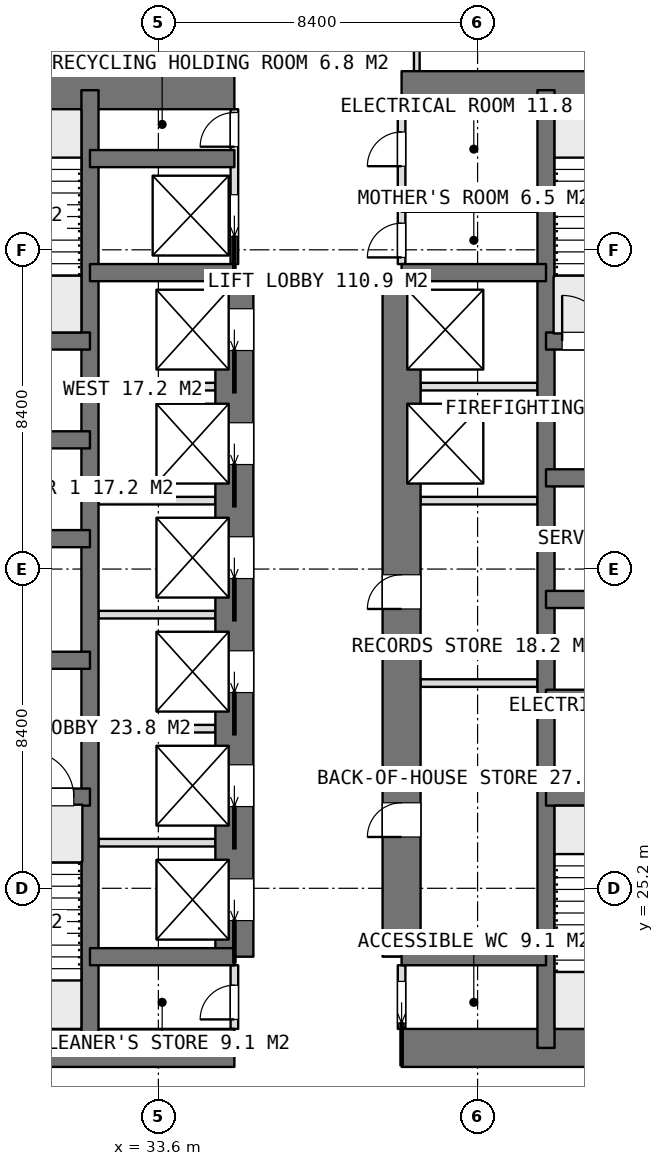
"""IFC4 building model, lengths in metres.
Left out: names, types, materials, properties, quantities, classifications, styles, units other than length and angle.
Written with IfcOpenShell. Run it as: python <this file> out.ifc"""

import sys

from ifc_helpers import new_model, si_unit, direction, frame, frame_2d, origin, place, context, subcontext, project, spatial, rectangle, extrude, element, fill, save


model = new_model("IFC4")
c1 = context("Model", 3, precision=1e-05, world=origin(), true_north=direction((0.0, 1.0)))
c2 = subcontext(c1, "Body", "Model", "MODEL_VIEW")
j1 = project(units=[si_unit("LENGTHUNIT", "METRE"), si_unit("PLANEANGLEUNIT", "RADIAN")], contexts=[c1])
p1 = place(None, origin())
s1 = spatial("IfcSite", under=j1, at=p1, CompositionType="ELEMENT")
p2 = place(p1, origin())
s2 = spatial("IfcBuilding", under=s1, at=p2, CompositionType="ELEMENT")
p3 = place(p2, frame((0.0, 0.0, 236.45)))
s3 = spatial("IfcBuildingStorey", under=s2, at=p3, CompositionType="ELEMENT", Elevation=236.45)
p4 = place(p3, frame((25.2, 21.0, 0.0), z_axis=(0.0, 0.0, 1.0), x_axis=(1.0, 0.0, 0.0)))
e1 = element("IfcWall", 1, at=p4, inside=s3, PredefinedType="SHEAR", context=c2, shape_type="SweptSolid", body=[
    extrude(rectangle(XDim=10.4, YDim=1.0, at=frame_2d((5.2, 0.0))), origin(), (0.0, 0.0, 1.0), 3.75),
])
p5 = place(p3, frame((40.0, 21.0, 0.0), z_axis=(0.0, 0.0, 1.0), x_axis=(1.0, 0.0, 0.0)))
e2 = element("IfcWall", 2, at=p5, inside=s3, PredefinedType="SHEAR", context=c2, shape_type="SweptSolid", body=[
    extrude(rectangle(XDim=10.4, YDim=1.0, at=frame_2d((5.2, 0.0))), origin(), (0.0, 0.0, 1.0), 3.75),
])
p6 = place(p3, frame((25.2, 46.2, 0.0), z_axis=(0.0, 0.0, 1.0), x_axis=(1.0, 0.0, 0.0)))
e3 = element("IfcWall", 3, at=p6, inside=s3, PredefinedType="SHEAR", context=c2, shape_type="SweptSolid", body=[
    extrude(rectangle(XDim=10.4, YDim=1.0, at=frame_2d((5.2, 0.0))), origin(), (0.0, 0.0, 1.0), 3.75),
])
p7 = place(p3, frame((40.0, 46.2, 0.0), z_axis=(0.0, 0.0, 1.0), x_axis=(1.0, 0.0, 0.0)))
e4 = element("IfcWall", 4, at=p7, inside=s3, PredefinedType="SHEAR", context=c2, shape_type="SweptSolid", body=[
    extrude(rectangle(XDim=10.4, YDim=1.0, at=frame_2d((5.2, 0.0))), origin(), (0.0, 0.0, 1.0), 3.75),
])
for number, where, z_axis, x_axis in (
    (5, (31.8, 21.0, 0.0), (0.0, 0.0, 1.0), (0.0, 1.0, 0.0)),
    (6, (43.8, 21.0, 0.0), (0.0, 0.0, 1.0), (0.0, 1.0, 0.0)),
):
    element("IfcWall", number, at=place(p3, frame(where, z_axis=z_axis, x_axis=x_axis)), inside=s3, PredefinedType="SHEAR", context=c2, shape_type="SweptSolid", body=[
        extrude(rectangle(XDim=25.2, YDim=0.45, at=frame_2d((12.6, 0.0))), origin(), (0.0, 0.0, 1.0), 3.75),
    ])
p8 = place(p3, frame((35.6, 23.4, 0.0), z_axis=(0.0, 0.0, 1.0), x_axis=(0.0, 1.0, 0.0)))
e7 = element("IfcWall", 7, at=p8, inside=s3, PredefinedType="SHEAR", context=c2, shape_type="SweptSolid", body=[
    extrude(rectangle(XDim=18.0, YDim=1.0, at=frame_2d((9.0, 0.0))), origin(), (0.0, 0.0, 1.0), 3.75),
])
p9 = place(p8, frame((0.95, 0.0, 0.0)))
e8 = element("IfcOpeningElement", 8, at=p9, cuts=e7, PredefinedType="OPENING", context=c2, shape_type="SweptSolid", body=[
    extrude(rectangle(XDim=1.1, YDim=2.1, at=frame_2d((0.55, 1.05))), frame((0.0, 0.51, 0.0), z_axis=(0.0, -1.0, 0.0), x_axis=(1.0, 0.0, 0.0)), (0.0, 0.0, 1.0), 1.02),
])
p10 = place(p8, frame((3.95, 0.0, 0.0)))
e9 = element("IfcOpeningElement", 9, at=p10, cuts=e7, PredefinedType="OPENING", context=c2, shape_type="SweptSolid", body=[
    extrude(rectangle(XDim=1.1, YDim=2.1, at=frame_2d((0.55, 1.05))), frame((0.0, 0.51, 0.0), z_axis=(0.0, -1.0, 0.0), x_axis=(1.0, 0.0, 0.0)), (0.0, 0.0, 1.0), 1.02),
])
p11 = place(p8, frame((6.95, 0.0, 0.0)))
e10 = element("IfcOpeningElement", 10, at=p11, cuts=e7, PredefinedType="OPENING", context=c2, shape_type="SweptSolid", body=[
    extrude(rectangle(XDim=1.1, YDim=2.1, at=frame_2d((0.55, 1.05))), frame((0.0, 0.51, 0.0), z_axis=(0.0, -1.0, 0.0), x_axis=(1.0, 0.0, 0.0)), (0.0, 0.0, 1.0), 1.02),
])
p12 = place(p8, frame((9.95, 0.0, 0.0)))
e11 = element("IfcOpeningElement", 11, at=p12, cuts=e7, PredefinedType="OPENING", context=c2, shape_type="SweptSolid", body=[
    extrude(rectangle(XDim=1.1, YDim=2.1, at=frame_2d((0.55, 1.05))), frame((0.0, 0.51, 0.0), z_axis=(0.0, -1.0, 0.0), x_axis=(1.0, 0.0, 0.0)), (0.0, 0.0, 1.0), 1.02),
])
p13 = place(p8, frame((12.95, 0.0, 0.0)))
e12 = element("IfcOpeningElement", 12, at=p13, cuts=e7, PredefinedType="OPENING", context=c2, shape_type="SweptSolid", body=[
    extrude(rectangle(XDim=1.1, YDim=2.1, at=frame_2d((0.55, 1.05))), frame((0.0, 0.51, 0.0), z_axis=(0.0, -1.0, 0.0), x_axis=(1.0, 0.0, 0.0)), (0.0, 0.0, 1.0), 1.02),
])
p14 = place(p8, frame((15.95, 0.0, 0.0)))
e13 = element("IfcOpeningElement", 13, at=p14, cuts=e7, PredefinedType="OPENING", context=c2, shape_type="SweptSolid", body=[
    extrude(rectangle(XDim=1.1, YDim=2.1, at=frame_2d((0.55, 1.05))), frame((0.0, 0.51, 0.0), z_axis=(0.0, -1.0, 0.0), x_axis=(1.0, 0.0, 0.0)), (0.0, 0.0, 1.0), 1.02),
])
p15 = place(p3, frame((40.0, 23.4, 0.0), z_axis=(0.0, 0.0, 1.0), x_axis=(0.0, 1.0, 0.0)))
e14 = element("IfcWall", 14, at=p15, inside=s3, PredefinedType="SHEAR", context=c2, shape_type="SweptSolid", body=[
    extrude(rectangle(XDim=18.0, YDim=1.0, at=frame_2d((9.0, 0.0))), origin(), (0.0, 0.0, 1.0), 3.75),
])
p16 = place(p15, frame((3.15, 0.0, 0.0)))
e15 = element("IfcOpeningElement", 15, at=p16, cuts=e14, PredefinedType="OPENING", context=c2, shape_type="SweptSolid", body=[
    extrude(rectangle(XDim=0.9, YDim=2.1, at=frame_2d((0.45, 1.05))), frame((0.0, 0.51, 0.0), z_axis=(0.0, -1.0, 0.0), x_axis=(1.0, 0.0, 0.0)), (0.0, 0.0, 1.0), 1.02),
])
p17 = place(p15, frame((9.15, 0.0, 0.0)))
e16 = element("IfcOpeningElement", 16, at=p17, cuts=e14, PredefinedType="OPENING", context=c2, shape_type="SweptSolid", body=[
    extrude(rectangle(XDim=0.9, YDim=2.1, at=frame_2d((0.45, 1.05))), frame((0.0, 0.51, 0.0), z_axis=(0.0, -1.0, 0.0), x_axis=(1.0, 0.0, 0.0)), (0.0, 0.0, 1.0), 1.02),
])
for number, where, z_axis, x_axis in (
    (17, (31.8, 23.4, 0.0), (0.0, 0.0, 1.0), (1.0, 0.0, 0.0)),
    (18, (31.8, 41.4, 0.0), (0.0, 0.0, 1.0), (1.0, 0.0, 0.0)),
    (19, (31.8, 44.4, 0.0), (0.0, 0.0, 1.0), (1.0, 0.0, 0.0)),
    (20, (40.0, 23.4, 0.0), (0.0, 0.0, 1.0), (1.0, 0.0, 0.0)),
    (21, (40.0, 41.4, 0.0), (0.0, 0.0, 1.0), (1.0, 0.0, 0.0)),
):
    element("IfcWall", number, at=place(p3, frame(where, z_axis=z_axis, x_axis=x_axis)), inside=s3, PredefinedType="SHEAR", context=c2, shape_type="SweptSolid", body=[
        extrude(rectangle(XDim=3.8, YDim=0.45, at=frame_2d((1.9, 0.0))), origin(), (0.0, 0.0, 1.0), 3.75),
    ])
p18 = place(p3, frame((25.2, 27.6, 0.0), z_axis=(0.0, 0.0, 1.0), x_axis=(1.0, 0.0, 0.0)))
e22 = element("IfcWall", 22, at=p18, inside=s3, PredefinedType="SHEAR", context=c2, shape_type="SweptSolid", body=[
    extrude(rectangle(XDim=6.6, YDim=0.45, at=frame_2d((3.3, 0.0))), origin(), (0.0, 0.0, 1.0), 3.75),
])
p19 = place(p18, frame((4.975, 0.0, 0.0)))
e23 = element("IfcOpeningElement", 23, at=p19, cuts=e22, PredefinedType="OPENING", context=c2, shape_type="SweptSolid", body=[
    extrude(rectangle(XDim=1.2, YDim=2.1, at=frame_2d((0.6, 1.05))), frame((0.0, 0.235, 0.0), z_axis=(0.0, -1.0, 0.0), x_axis=(1.0, 0.0, 0.0)), (0.0, 0.0, 1.0), 0.47),
])
p20 = place(p3, frame((25.2, 31.2, 0.0), z_axis=(0.0, 0.0, 1.0), x_axis=(1.0, 0.0, 0.0)))
e24 = element("IfcWall", 24, at=p20, inside=s3, PredefinedType="SHEAR", context=c2, shape_type="SweptSolid", body=[
    extrude(rectangle(XDim=6.6, YDim=0.45, at=frame_2d((3.3, 0.0))), origin(), (0.0, 0.0, 1.0), 3.75),
])
p21 = place(p20, frame((2.65, 0.0, 0.0)))
e25 = element("IfcOpeningElement", 25, at=p21, cuts=e24, PredefinedType="OPENING", context=c2, shape_type="SweptSolid", body=[
    extrude(rectangle(XDim=1.3, YDim=2.1, at=frame_2d((0.65, 1.05))), frame((0.0, 0.235, 0.0), z_axis=(0.0, -1.0, 0.0), x_axis=(1.0, 0.0, 0.0)), (0.0, 0.0, 1.0), 0.47),
])
for number, where, z_axis, x_axis in (
    (26, (25.2, 34.4, 0.0), (0.0, 0.0, 1.0), (1.0, 0.0, 0.0)),
    (27, (25.2, 37.0, 0.0), (0.0, 0.0, 1.0), (1.0, 0.0, 0.0)),
    (28, (25.2, 39.6, 0.0), (0.0, 0.0, 1.0), (1.0, 0.0, 0.0)),
):
    element("IfcWall", number, at=place(p3, frame(where, z_axis=z_axis, x_axis=x_axis)), inside=s3, PredefinedType="SHEAR", context=c2, shape_type="SweptSolid", body=[
        extrude(rectangle(XDim=6.6, YDim=0.45, at=frame_2d((3.3, 0.0))), origin(), (0.0, 0.0, 1.0), 3.75),
    ])
for number, where, z_axis, x_axis in (
    (29, (43.8, 27.6, 0.0), (0.0, 0.0, 1.0), (1.0, 0.0, 0.0)),
    (30, (43.8, 30.2, 0.0), (0.0, 0.0, 1.0), (1.0, 0.0, 0.0)),
    (31, (43.8, 32.8, 0.0), (0.0, 0.0, 1.0), (1.0, 0.0, 0.0)),
):
    element("IfcWall", number, at=place(p3, frame(where, z_axis=z_axis, x_axis=x_axis)), inside=s3, PredefinedType="SHEAR", context=c2, shape_type="SweptSolid", body=[
        extrude(rectangle(XDim=6.6, YDim=0.45, at=frame_2d((3.3, 0.0))), origin(), (0.0, 0.0, 1.0), 3.75),
    ])
p22 = place(p3, frame((43.8, 36.0, 0.0), z_axis=(0.0, 0.0, 1.0), x_axis=(1.0, 0.0, 0.0)))
e32 = element("IfcWall", 32, at=p22, inside=s3, PredefinedType="SHEAR", context=c2, shape_type="SweptSolid", body=[
    extrude(rectangle(XDim=6.6, YDim=0.45, at=frame_2d((3.3, 0.0))), origin(), (0.0, 0.0, 1.0), 3.75),
])
p23 = place(p22, frame((2.65, 0.0, 0.0)))
e33 = element("IfcOpeningElement", 33, at=p23, cuts=e32, PredefinedType="OPENING", context=c2, shape_type="SweptSolid", body=[
    extrude(rectangle(XDim=1.3, YDim=2.1, at=frame_2d((0.65, 1.05))), frame((0.0, 0.235, 0.0), z_axis=(0.0, -1.0, 0.0), x_axis=(1.0, 0.0, 0.0)), (0.0, 0.0, 1.0), 0.47),
])
p24 = place(p3, frame((43.8, 39.6, 0.0), z_axis=(0.0, 0.0, 1.0), x_axis=(1.0, 0.0, 0.0)))
e34 = element("IfcWall", 34, at=p24, inside=s3, PredefinedType="SHEAR", context=c2, shape_type="SweptSolid", body=[
    extrude(rectangle(XDim=6.6, YDim=0.45, at=frame_2d((3.3, 0.0))), origin(), (0.0, 0.0, 1.0), 3.75),
])
p25 = place(p24, frame((0.425, 0.0, 0.0)))
e35 = element("IfcOpeningElement", 35, at=p25, cuts=e34, PredefinedType="OPENING", context=c2, shape_type="SweptSolid", body=[
    extrude(rectangle(XDim=1.2, YDim=2.1, at=frame_2d((0.6, 1.05))), frame((0.0, 0.235, 0.0), z_axis=(0.0, -1.0, 0.0), x_axis=(1.0, 0.0, 0.0)), (0.0, 0.0, 1.0), 0.47),
])
for number, where, z_axis, x_axis in (
    (36, (32.025, 26.4, 0.0), (0.0, 0.0, 1.0), (1.0, 0.0, 0.0)),
    (37, (32.025, 29.4, 0.0), (0.0, 0.0, 1.0), (1.0, 0.0, 0.0)),
    (38, (32.025, 32.4, 0.0), (0.0, 0.0, 1.0), (1.0, 0.0, 0.0)),
    (39, (32.025, 35.4, 0.0), (0.0, 0.0, 1.0), (1.0, 0.0, 0.0)),
    (40, (32.025, 38.4, 0.0), (0.0, 0.0, 1.0), (1.0, 0.0, 0.0)),
):
    element("IfcWall", number, at=place(p3, frame(where, z_axis=z_axis, x_axis=x_axis)), inside=s3, PredefinedType="PARTITIONING", context=c2, shape_type="SweptSolid", body=[
        extrude(rectangle(XDim=3.075, YDim=0.2, at=frame_2d((1.538, 0.0))), origin(), (0.0, 0.0, 1.0), 3.4),
    ])
for number, where, z_axis, x_axis in (
    (41, (40.5, 35.4, 0.0), (0.0, 0.0, 1.0), (1.0, 0.0, 0.0)),
    (42, (40.5, 38.4, 0.0), (0.0, 0.0, 1.0), (1.0, 0.0, 0.0)),
):
    element("IfcWall", number, at=place(p3, frame(where, z_axis=z_axis, x_axis=x_axis)), inside=s3, PredefinedType="PARTITIONING", context=c2, shape_type="SweptSolid", body=[
        extrude(rectangle(XDim=3.075, YDim=0.2, at=frame_2d((1.538, 0.0))), origin(), (0.0, 0.0, 1.0), 3.4),
    ])
p26 = place(p3, frame((40.0, 21.5, 0.0), z_axis=(0.0, 0.0, 1.0), x_axis=(0.0, 1.0, 0.0)))
e43 = element("IfcWall", 43, at=p26, inside=s3, PredefinedType="PARTITIONING", context=c2, shape_type="SweptSolid", body=[
    extrude(rectangle(XDim=1.675, YDim=0.2, at=frame_2d((0.837, 0.0))), origin(), (0.0, 0.0, 1.0), 3.4),
])
p27 = place(p26, frame((0.15, 0.0, 0.0)))
e44 = element("IfcOpeningElement", 44, at=p27, cuts=e43, PredefinedType="OPENING", context=c2, shape_type="SweptSolid", body=[
    extrude(rectangle(XDim=1.1, YDim=2.1, at=frame_2d((0.55, 1.05))), frame((0.0, 0.11, 0.0), z_axis=(0.0, -1.0, 0.0), x_axis=(1.0, 0.0, 0.0)), (0.0, 0.0, 1.0), 0.22),
])
p28 = place(p3, frame((40.0, 41.625, 0.0), z_axis=(0.0, 0.0, 1.0), x_axis=(0.0, 1.0, 0.0)))
e45 = element("IfcWall", 45, at=p28, inside=s3, PredefinedType="PARTITIONING", context=c2, shape_type="SweptSolid", body=[
    extrude(rectangle(XDim=4.075, YDim=0.2, at=frame_2d((2.038, 0.0))), origin(), (0.0, 0.0, 1.0), 3.4),
])
p29 = place(p28, frame((2.575, 0.0, 0.0)))
e46 = element("IfcOpeningElement", 46, at=p29, cuts=e45, PredefinedType="OPENING", context=c2, shape_type="SweptSolid", body=[
    extrude(rectangle(XDim=0.9, YDim=2.1, at=frame_2d((0.45, 1.05))), frame((0.0, 0.11, 0.0), z_axis=(0.0, -1.0, 0.0), x_axis=(1.0, 0.0, 0.0)), (0.0, 0.0, 1.0), 0.22),
])
p30 = place(p28, frame((0.175, 0.0, 0.0)))
e47 = element("IfcOpeningElement", 47, at=p30, cuts=e45, PredefinedType="OPENING", context=c2, shape_type="SweptSolid", body=[
    extrude(rectangle(XDim=0.9, YDim=2.1, at=frame_2d((0.45, 1.05))), frame((0.0, 0.11, 0.0), z_axis=(0.0, -1.0, 0.0), x_axis=(1.0, 0.0, 0.0)), (0.0, 0.0, 1.0), 0.22),
])
p31 = place(p3, frame((35.6, 41.625, 0.0), z_axis=(0.0, 0.0, 1.0), x_axis=(0.0, 1.0, 0.0)))
e48 = element("IfcWall", 48, at=p31, inside=s3, PredefinedType="PARTITIONING", context=c2, shape_type="SweptSolid", body=[
    extrude(rectangle(XDim=4.075, YDim=0.2, at=frame_2d((2.038, 0.0))), origin(), (0.0, 0.0, 1.0), 3.4),
])
p32 = place(p31, frame((3.088, 0.0, 0.0)))
e49 = element("IfcOpeningElement", 49, at=p32, cuts=e48, PredefinedType="OPENING", context=c2, shape_type="SweptSolid", body=[
    extrude(rectangle(XDim=0.9, YDim=2.1, at=frame_2d((0.45, 1.05))), frame((0.0, 0.11, 0.0), z_axis=(0.0, -1.0, 0.0), x_axis=(1.0, 0.0, 0.0)), (0.0, 0.0, 1.0), 0.22),
])
p33 = place(p31, frame((0.725, 0.0, 0.0)))
e50 = element("IfcOpeningElement", 50, at=p33, cuts=e48, PredefinedType="OPENING", context=c2, shape_type="SweptSolid", body=[
    extrude(rectangle(XDim=1.1, YDim=2.1, at=frame_2d((0.55, 1.05))), frame((0.0, 0.11, 0.0), z_axis=(0.0, -1.0, 0.0), x_axis=(1.0, 0.0, 0.0)), (0.0, 0.0, 1.0), 0.22),
])
p34 = place(p3, frame((35.6, 21.5, 0.0), z_axis=(0.0, 0.0, 1.0), x_axis=(0.0, 1.0, 0.0)))
e51 = element("IfcWall", 51, at=p34, inside=s3, PredefinedType="PARTITIONING", context=c2, shape_type="SweptSolid", body=[
    extrude(rectangle(XDim=1.675, YDim=0.2, at=frame_2d((0.837, 0.0))), origin(), (0.0, 0.0, 1.0), 3.4),
])
p35 = place(p34, frame((0.25, 0.0, 0.0)))
e52 = element("IfcOpeningElement", 52, at=p35, cuts=e51, PredefinedType="OPENING", context=c2, shape_type="SweptSolid", body=[
    extrude(rectangle(XDim=0.9, YDim=2.1, at=frame_2d((0.45, 1.05))), frame((0.0, 0.11, 0.0), z_axis=(0.0, -1.0, 0.0), x_axis=(1.0, 0.0, 0.0)), (0.0, 0.0, 1.0), 0.22),
])
p36 = place(p3, frame((40.5, 30.6, 0.0), z_axis=(0.0, 0.0, 1.0), x_axis=(1.0, 0.0, 0.0)))
e53 = element("IfcWall", 53, at=p36, inside=s3, PredefinedType="PARTITIONING", context=c2, shape_type="SweptSolid", body=[
    extrude(rectangle(XDim=3.075, YDim=0.2, at=frame_2d((1.538, 0.0))), origin(), (0.0, 0.0, 1.0), 3.4),
])
p37 = place(p3, frame((40.0, 43.1, 0.0), z_axis=(0.0, 0.0, 1.0), x_axis=(1.0, 0.0, 0.0)))
e54 = element("IfcWall", 54, at=p37, inside=s3, PredefinedType="PARTITIONING", context=c2, shape_type="SweptSolid", body=[
    extrude(rectangle(XDim=3.575, YDim=0.2, at=frame_2d((1.788, 0.0))), origin(), (0.0, 0.0, 1.0), 3.4),
])
for number, where, z_axis, x_axis in (
    (55, (40.4, 46.7, 0.0), (0.0, 0.0, 1.0), (0.0, 1.0, 0.0)),
    (56, (35.2, 46.7, 0.0), (0.0, 0.0, 1.0), (0.0, 1.0, 0.0)),
):
    element("IfcWall", number, at=place(p3, frame(where, z_axis=z_axis, x_axis=x_axis)), inside=s3, PredefinedType="PARTITIONING", context=c2, shape_type="SweptSolid", body=[
        extrude(rectangle(XDim=2.625, YDim=0.15, at=frame_2d((1.312, 0.0))), origin(), (0.0, 0.0, 1.0), 3.4),
    ])
p38 = place(p27, origin())
e57 = element("IfcDoor", 57, at=p38, inside=s3, OperationType="SLIDING_TO_LEFT", PredefinedType="DOOR", context=c2, shape_type="SweptSolid", body=[
    extrude(rectangle(XDim=1.1, YDim=2.1, at=frame_2d((0.55, 1.05))), frame((0.0, 0.025, 0.0), z_axis=(0.0, -1.0, 0.0), x_axis=(1.0, 0.0, 0.0)), (0.0, 0.0, 1.0), 0.05),
])
fill(e44, e57)
p39 = place(p35, origin())
e58 = element("IfcDoor", 58, at=p39, inside=s3, OperationType="SINGLE_SWING_LEFT", PredefinedType="DOOR", context=c2, shape_type="SweptSolid", body=[
    extrude(rectangle(XDim=0.9, YDim=2.1, at=frame_2d((0.45, 1.05))), frame((0.0, 0.025, 0.0), z_axis=(0.0, -1.0, 0.0), x_axis=(1.0, 0.0, 0.0)), (0.0, 0.0, 1.0), 0.05),
])
fill(e52, e58)
p40 = place(p29, origin())
e59 = element("IfcDoor", 59, at=p40, inside=s3, OperationType="SINGLE_SWING_LEFT", PredefinedType="DOOR", context=c2, shape_type="SweptSolid", body=[
    extrude(rectangle(XDim=0.9, YDim=2.1, at=frame_2d((0.45, 1.05))), frame((0.0, 0.025, 0.0), z_axis=(0.0, -1.0, 0.0), x_axis=(1.0, 0.0, 0.0)), (0.0, 0.0, 1.0), 0.05),
])
fill(e46, e59)
p41 = place(p30, origin())
e60 = element("IfcDoor", 60, at=p41, inside=s3, OperationType="SINGLE_SWING_LEFT", PredefinedType="DOOR", context=c2, shape_type="SweptSolid", body=[
    extrude(rectangle(XDim=0.9, YDim=2.1, at=frame_2d((0.45, 1.05))), frame((0.0, 0.025, 0.0), z_axis=(0.0, -1.0, 0.0), x_axis=(1.0, 0.0, 0.0)), (0.0, 0.0, 1.0), 0.05),
])
fill(e47, e60)
p42 = place(p16, origin())
e61 = element("IfcDoor", 61, at=p42, inside=s3, OperationType="SINGLE_SWING_LEFT", PredefinedType="DOOR", context=c2, shape_type="SweptSolid", body=[
    extrude(rectangle(XDim=0.9, YDim=2.1, at=frame_2d((0.45, 1.05))), frame((0.0, 0.025, 0.0), z_axis=(0.0, -1.0, 0.0), x_axis=(1.0, 0.0, 0.0)), (0.0, 0.0, 1.0), 0.05),
])
fill(e15, e61)
p43 = place(p17, origin())
e62 = element("IfcDoor", 62, at=p43, inside=s3, OperationType="SINGLE_SWING_LEFT", PredefinedType="DOOR", context=c2, shape_type="SweptSolid", body=[
    extrude(rectangle(XDim=0.9, YDim=2.1, at=frame_2d((0.45, 1.05))), frame((0.0, 0.025, 0.0), z_axis=(0.0, -1.0, 0.0), x_axis=(1.0, 0.0, 0.0)), (0.0, 0.0, 1.0), 0.05),
])
fill(e16, e62)
p44 = place(p32, origin())
e63 = element("IfcDoor", 63, at=p44, inside=s3, OperationType="SINGLE_SWING_LEFT", PredefinedType="DOOR", context=c2, shape_type="SweptSolid", body=[
    extrude(rectangle(XDim=0.9, YDim=2.1, at=frame_2d((0.45, 1.05))), frame((0.0, 0.025, 0.0), z_axis=(0.0, -1.0, 0.0), x_axis=(1.0, 0.0, 0.0)), (0.0, 0.0, 1.0), 0.05),
])
fill(e49, e63)
p45 = place(p9, origin())
e64 = element("IfcDoor", 64, at=p45, inside=s3, OperationType="SLIDING_TO_LEFT", PredefinedType="USERDEFINED", context=c2, shape_type="SweptSolid", body=[
    extrude(rectangle(XDim=1.1, YDim=2.1, at=frame_2d((0.55, 1.05))), frame((0.0, 0.025, 0.0), z_axis=(0.0, -1.0, 0.0), x_axis=(1.0, 0.0, 0.0)), (0.0, 0.0, 1.0), 0.05),
])
fill(e8, e64)
p46 = place(p10, origin())
e65 = element("IfcDoor", 65, at=p46, inside=s3, OperationType="SLIDING_TO_LEFT", PredefinedType="USERDEFINED", context=c2, shape_type="SweptSolid", body=[
    extrude(rectangle(XDim=1.1, YDim=2.1, at=frame_2d((0.55, 1.05))), frame((0.0, 0.025, 0.0), z_axis=(0.0, -1.0, 0.0), x_axis=(1.0, 0.0, 0.0)), (0.0, 0.0, 1.0), 0.05),
])
fill(e9, e65)
p47 = place(p11, origin())
e66 = element("IfcDoor", 66, at=p47, inside=s3, OperationType="SLIDING_TO_LEFT", PredefinedType="USERDEFINED", context=c2, shape_type="SweptSolid", body=[
    extrude(rectangle(XDim=1.1, YDim=2.1, at=frame_2d((0.55, 1.05))), frame((0.0, 0.025, 0.0), z_axis=(0.0, -1.0, 0.0), x_axis=(1.0, 0.0, 0.0)), (0.0, 0.0, 1.0), 0.05),
])
fill(e10, e66)
p48 = place(p12, origin())
e67 = element("IfcDoor", 67, at=p48, inside=s3, OperationType="SLIDING_TO_LEFT", PredefinedType="USERDEFINED", context=c2, shape_type="SweptSolid", body=[
    extrude(rectangle(XDim=1.1, YDim=2.1, at=frame_2d((0.55, 1.05))), frame((0.0, 0.025, 0.0), z_axis=(0.0, -1.0, 0.0), x_axis=(1.0, 0.0, 0.0)), (0.0, 0.0, 1.0), 0.05),
])
fill(e11, e67)
p49 = place(p13, origin())
e68 = element("IfcDoor", 68, at=p49, inside=s3, OperationType="SLIDING_TO_LEFT", PredefinedType="USERDEFINED", context=c2, shape_type="SweptSolid", body=[
    extrude(rectangle(XDim=1.1, YDim=2.1, at=frame_2d((0.55, 1.05))), frame((0.0, 0.025, 0.0), z_axis=(0.0, -1.0, 0.0), x_axis=(1.0, 0.0, 0.0)), (0.0, 0.0, 1.0), 0.05),
])
fill(e12, e68)
p50 = place(p14, origin())
e69 = element("IfcDoor", 69, at=p50, inside=s3, OperationType="SLIDING_TO_LEFT", PredefinedType="USERDEFINED", context=c2, shape_type="SweptSolid", body=[
    extrude(rectangle(XDim=1.1, YDim=2.1, at=frame_2d((0.55, 1.05))), frame((0.0, 0.025, 0.0), z_axis=(0.0, -1.0, 0.0), x_axis=(1.0, 0.0, 0.0)), (0.0, 0.0, 1.0), 0.05),
])
fill(e13, e69)
p51 = place(p33, origin())
e70 = element("IfcDoor", 70, at=p51, inside=s3, OperationType="SLIDING_TO_LEFT", PredefinedType="USERDEFINED", context=c2, shape_type="SweptSolid", body=[
    extrude(rectangle(XDim=1.1, YDim=2.1, at=frame_2d((0.55, 1.05))), frame((0.0, 0.025, 0.0), z_axis=(0.0, -1.0, 0.0), x_axis=(1.0, 0.0, 0.0)), (0.0, 0.0, 1.0), 0.05),
])
fill(e50, e70)
p52 = place(p19, origin())
e71 = element("IfcDoor", 71, at=p52, inside=s3, OperationType="SINGLE_SWING_RIGHT", PredefinedType="DOOR", context=c2, shape_type="SweptSolid", body=[
    extrude(rectangle(XDim=1.2, YDim=2.1, at=frame_2d((0.6, 1.05))), frame((0.0, 0.025, 0.0), z_axis=(0.0, -1.0, 0.0), x_axis=(1.0, 0.0, 0.0)), (0.0, 0.0, 1.0), 0.05),
])
fill(e23, e71)
p53 = place(p25, origin())
e72 = element("IfcDoor", 72, at=p53, inside=s3, OperationType="SINGLE_SWING_RIGHT", PredefinedType="DOOR", context=c2, shape_type="SweptSolid", body=[
    extrude(rectangle(XDim=1.2, YDim=2.1, at=frame_2d((0.6, 1.05))), frame((0.0, 0.025, 0.0), z_axis=(0.0, -1.0, 0.0), x_axis=(1.0, 0.0, 0.0)), (0.0, 0.0, 1.0), 0.05),
])
fill(e35, e72)
save(model, sys.argv[1])
